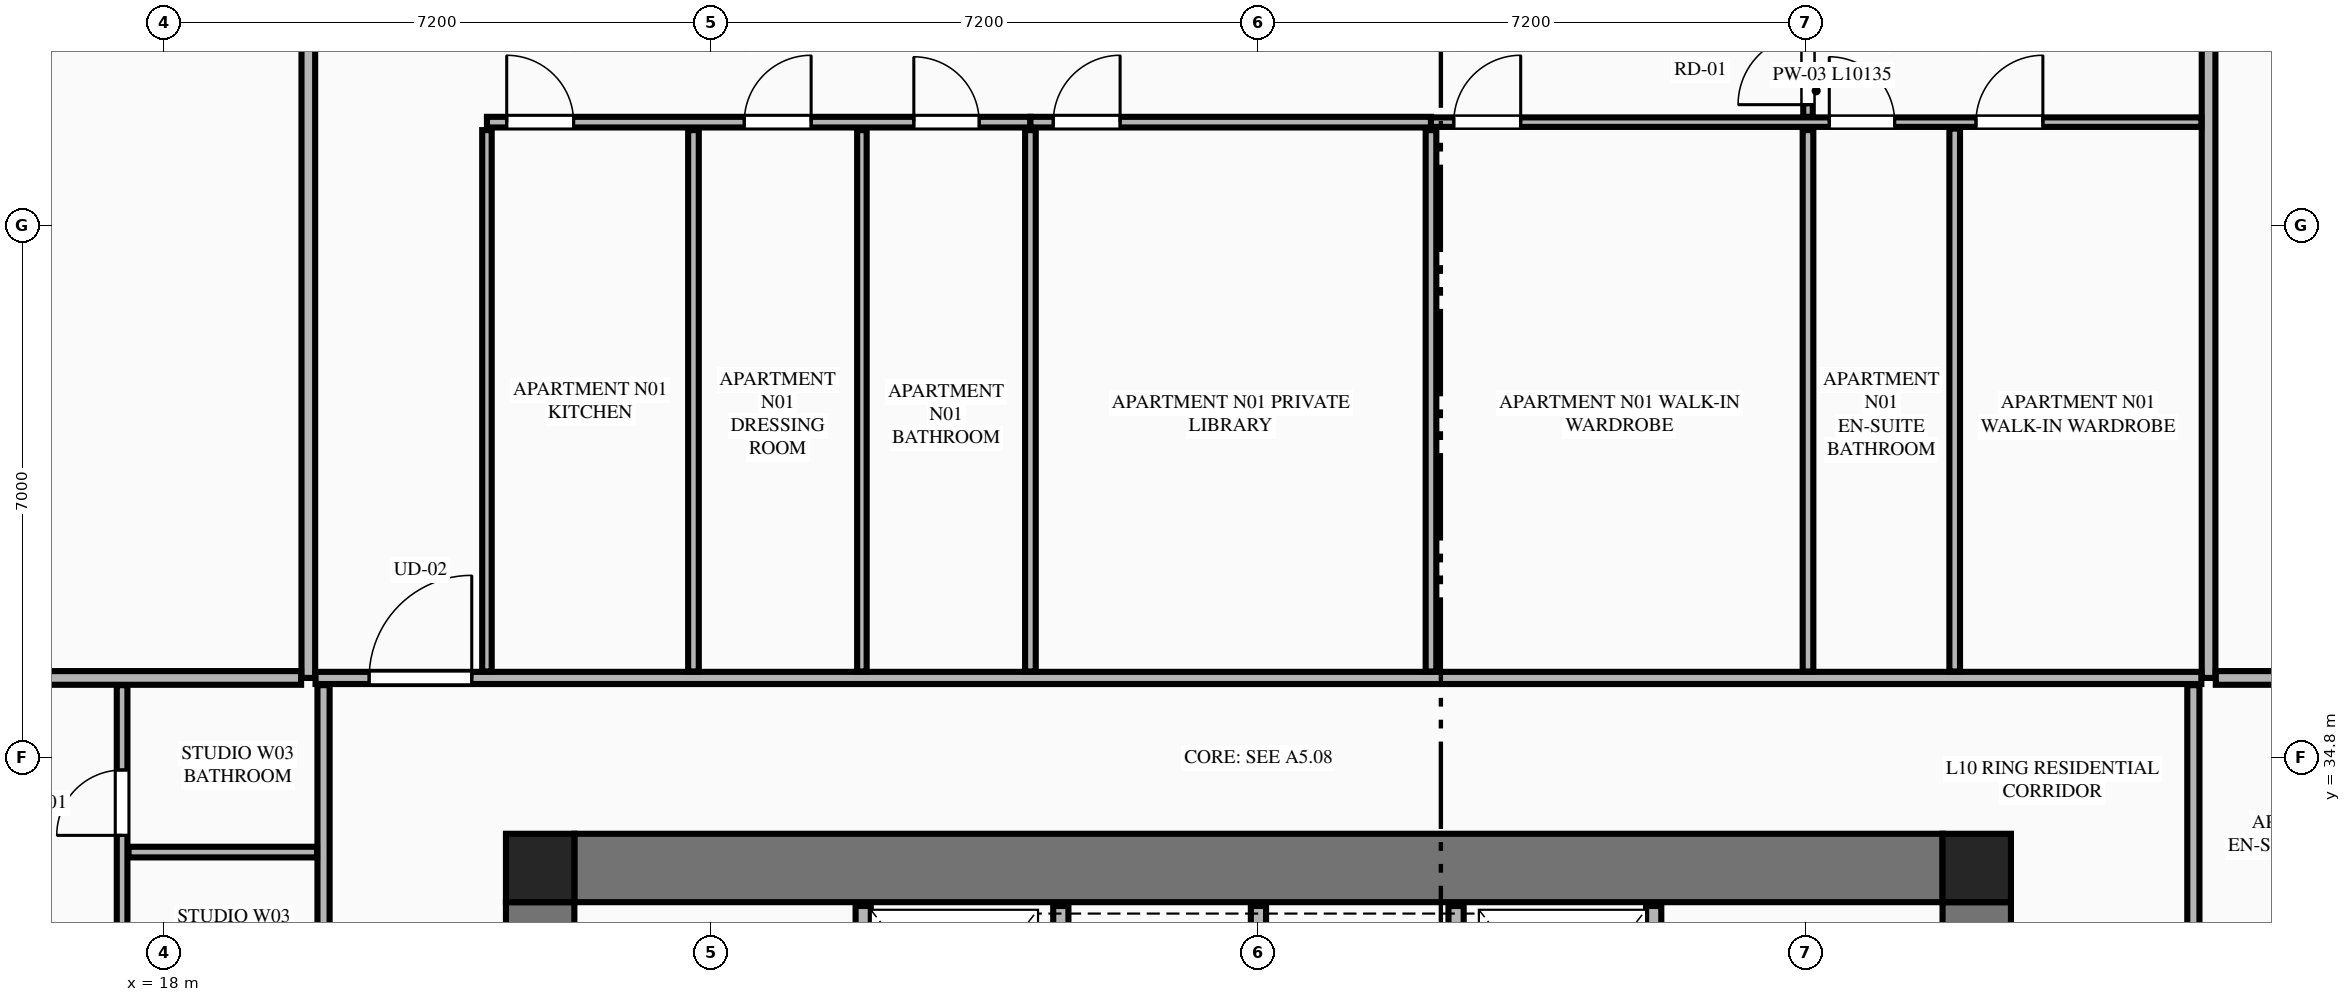
"""IFC4 building model, lengths in metres.
Left out: names, types, materials, properties, quantities, classifications, styles, units other than length and angle.
Written with IfcOpenShell. Run it as: python <this file> out.ifc"""

import sys

from ifc_helpers import new_model, si_unit, direction, frame, frame_2d, origin, origin_2d, place, context, subcontext, project, spatial, rectangle, extrude, element, fill, save


model = new_model("IFC4")
c1 = context("Model", 3, precision=1e-05, world=origin(), true_north=direction((0.0, 1.0)))
c2 = subcontext(c1, "Body", "Model", "MODEL_VIEW")
j1 = project(units=[si_unit("LENGTHUNIT", "METRE"), si_unit("PLANEANGLEUNIT", "RADIAN")], contexts=[c1])
p1 = place(None, origin())
s1 = spatial("IfcSite", under=j1, at=p1, CompositionType="ELEMENT")
p2 = place(p1, origin())
s2 = spatial("IfcBuilding", under=s1, at=p2, CompositionType="ELEMENT")
p3 = place(p2, frame((0.0, 0.0, 42.65)))
s3 = spatial("IfcBuildingStorey", under=s2, at=p3, CompositionType="ELEMENT", Elevation=42.65)
for number, where, z_axis, x_axis in (
    (1, (41.85, 33.35, 0.0), (0.0, 0.0, 1.0), (1.0, 0.0, 0.0)),
    (2, (22.95, 33.35, 0.0), (0.0, 0.0, 1.0), (1.0, 0.0, 0.0)),
):
    element("IfcColumn", number, at=place(p3, frame(where, z_axis=z_axis, x_axis=x_axis)), inside=s3, PredefinedType="COLUMN", context=c2, shape_type="SweptSolid", body=[
        extrude(rectangle(XDim=0.9, YDim=0.9, at=origin_2d()), origin(), (0.0, 0.0, 1.0), 3.55),
    ])
p4 = place(p3, frame((23.4, 33.35, 0.0), z_axis=(0.0, 0.0, 1.0), x_axis=(1.0, 0.0, 0.0)))
e3 = element("IfcWall", 3, at=p4, inside=s3, PredefinedType="SHEAR", context=c2, shape_type="SweptSolid", body=[
    extrude(rectangle(XDim=18.0, YDim=0.9, at=frame_2d((9.0, 0.0))), origin(), (0.0, 0.0, 1.0), 3.33),
])
p5 = place(p3, frame((22.95, 18.9, 0.0), z_axis=(0.0, 0.0, 1.0), x_axis=(0.0, 1.0, 0.0)))
e4 = element("IfcWall", 4, at=p5, inside=s3, PredefinedType="SHEAR", context=c2, shape_type="SweptSolid", body=[
    extrude(rectangle(XDim=14.0, YDim=0.9, at=frame_2d((7.0, 0.0))), origin(), (0.0, 0.0, 1.0), 3.33),
])
p6 = place(p5, frame((2.94, 0.0, 0.0)))
e5 = element("IfcOpeningElement", 5, at=p6, cuts=e4, PredefinedType="OPENING", context=c2, shape_type="SweptSolid", body=[
    extrude(rectangle(XDim=1.22, YDim=2.25, at=frame_2d((0.61, 1.125))), frame((0.0, 0.46, 0.0), z_axis=(0.0, -1.0, 0.0), x_axis=(1.0, 0.0, 0.0)), (0.0, 0.0, 1.0), 0.92),
])
p7 = place(p3, frame((41.85, 18.9, 0.0), z_axis=(0.0, 0.0, 1.0), x_axis=(0.0, 1.0, 0.0)))
e6 = element("IfcWall", 6, at=p7, inside=s3, PredefinedType="SHEAR", context=c2, shape_type="SweptSolid", body=[
    extrude(rectangle(XDim=14.0, YDim=0.9, at=frame_2d((7.0, 0.0))), origin(), (0.0, 0.0, 1.0), 3.33),
])
p8 = place(p7, frame((2.94, 0.0, 0.0)))
e7 = element("IfcOpeningElement", 7, at=p8, cuts=e6, PredefinedType="OPENING", context=c2, shape_type="SweptSolid", body=[
    extrude(rectangle(XDim=1.22, YDim=2.25, at=frame_2d((0.61, 1.125))), frame((0.0, 0.46, 0.0), z_axis=(0.0, -1.0, 0.0), x_axis=(1.0, 0.0, 0.0)), (0.0, 0.0, 1.0), 0.92),
])
for number, where, z_axis, x_axis in (
    (8, (27.2, 30.0, 0.0), (0.0, 0.0, 1.0), (0.0, 1.0, 0.0)),
    (9, (29.8, 30.0, 0.0), (0.0, 0.0, 1.0), (0.0, 1.0, 0.0)),
    (10, (32.4, 30.0, 0.0), (0.0, 0.0, 1.0), (0.0, 1.0, 0.0)),
    (11, (35.0, 30.0, 0.0), (0.0, 0.0, 1.0), (0.0, 1.0, 0.0)),
    (12, (37.6, 30.0, 0.0), (0.0, 0.0, 1.0), (0.0, 1.0, 0.0)),
):
    element("IfcWall", number, at=place(p3, frame(where, z_axis=z_axis, x_axis=x_axis)), inside=s3, PredefinedType="PLUMBINGWALL", context=c2, shape_type="SweptSolid", body=[
        extrude(rectangle(XDim=2.85, YDim=0.2, at=frame_2d((1.425, 0.0))), origin(), (0.0, 0.0, 1.0), 3.33),
    ])
for number, where, z_axis, x_axis in (
    (13, (19.9, 35.85, 0.0), (0.0, 0.0, 1.0), (0.0, 1.0, 0.0)),
    (14, (44.9, 35.85, 0.0), (0.0, 0.0, 1.0), (0.0, 1.0, 0.0)),
):
    element("IfcWall", number, at=place(p3, frame(where, z_axis=z_axis, x_axis=x_axis)), inside=s3, PredefinedType="PARTITIONING", context=c2, shape_type="SweptSolid", body=[
        extrude(rectangle(XDim=13.295, YDim=0.18, at=frame_2d((6.647, 0.0))), origin(), (0.0, 0.0, 1.0), 3.33),
    ])
p9 = place(p3, frame((19.995, 35.85, 0.0), z_axis=(0.0, 0.0, 1.0), x_axis=(1.0, 0.0, 0.0)))
e15 = element("IfcWall", 15, at=p9, inside=s3, PredefinedType="PARTITIONING", context=c2, shape_type="SweptSolid", body=[
    extrude(rectangle(XDim=24.81, YDim=0.16, at=frame_2d((12.405, 0.0))), origin(), (0.0, 0.0, 1.0), 3.33),
])
p10 = place(p9, frame((0.705, 0.0, 0.0)))
e16 = element("IfcOpeningElement", 16, at=p10, cuts=e15, PredefinedType="OPENING", context=c2, shape_type="SweptSolid", body=[
    extrude(rectangle(XDim=1.35, YDim=2.35, at=frame_2d((0.675, 1.175))), frame((0.0, 0.09, 0.0), z_axis=(0.0, -1.0, 0.0), x_axis=(1.0, 0.0, 0.0)), (0.0, 0.0, 1.0), 0.18),
])
p11 = place(p3, frame((22.25, 35.935, 0.0), z_axis=(0.0, 0.0, 1.0), x_axis=(0.0, 1.0, 0.0)))
e17 = element("IfcWall", 17, at=p11, inside=s3, PredefinedType="PARTITIONING", context=c2, shape_type="SweptSolid", body=[
    extrude(rectangle(XDim=7.122, YDim=0.125, at=frame_2d((3.561, 0.0))), origin(), (0.0, 0.0, 1.0), 2.7),
])
p12 = place(p3, frame((22.25, 43.162, 0.0), z_axis=(0.0, 0.0, 1.0), x_axis=(1.0, 0.0, 0.0)))
e18 = element("IfcWall", 18, at=p12, inside=s3, PredefinedType="PLUMBINGWALL", context=c2, shape_type="SweptSolid", body=[
    extrude(rectangle(XDim=7.15, YDim=0.14, at=frame_2d((3.575, 0.0))), origin(), (0.0, 0.0, 1.0), 3.33),
])
p13 = place(p12, frame((5.616, 0.0, 0.0)))
e19 = element("IfcOpeningElement", 19, at=p13, cuts=e18, PredefinedType="OPENING", context=c2, shape_type="SweptSolid", body=[
    extrude(rectangle(XDim=0.86, YDim=2.1, at=frame_2d((0.43, 1.05))), frame((0.0, 0.08, 0.0), z_axis=(0.0, -1.0, 0.0), x_axis=(1.0, 0.0, 0.0)), (0.0, 0.0, 1.0), 0.16),
])
p14 = place(p12, frame((0.26, 0.0, 0.0)))
e20 = element("IfcOpeningElement", 20, at=p14, cuts=e18, PredefinedType="OPENING", context=c2, shape_type="SweptSolid", body=[
    extrude(rectangle(XDim=0.88, YDim=2.15, at=frame_2d((0.44, 1.075))), frame((0.0, 0.08, 0.0), z_axis=(0.0, -1.0, 0.0), x_axis=(1.0, 0.0, 0.0)), (0.0, 0.0, 1.0), 0.16),
])
p15 = place(p12, frame((3.385, 0.0, 0.0)))
e21 = element("IfcOpeningElement", 21, at=p15, cuts=e18, PredefinedType="OPENING", context=c2, shape_type="SweptSolid", body=[
    extrude(rectangle(XDim=0.88, YDim=2.15, at=frame_2d((0.44, 1.075))), frame((0.0, 0.08, 0.0), z_axis=(0.0, -1.0, 0.0), x_axis=(1.0, 0.0, 0.0)), (0.0, 0.0, 1.0), 0.16),
])
p16 = place(p3, frame((29.4, 43.162, 0.0), z_axis=(0.0, 0.0, 1.0), x_axis=(1.0, 0.0, 0.0)))
e22 = element("IfcWall", 22, at=p16, inside=s3, PredefinedType="PLUMBINGWALL", context=c2, shape_type="SweptSolid", body=[
    extrude(rectangle(XDim=5.27, YDim=0.14, at=frame_2d((2.635, 0.0))), origin(), (0.0, 0.0, 1.0), 3.33),
])
p17 = place(p16, frame((0.3, 0.0, 0.0)))
e23 = element("IfcOpeningElement", 23, at=p17, cuts=e22, PredefinedType="OPENING", context=c2, shape_type="SweptSolid", body=[
    extrude(rectangle(XDim=0.88, YDim=2.15, at=frame_2d((0.44, 1.075))), frame((0.0, 0.08, 0.0), z_axis=(0.0, -1.0, 0.0), x_axis=(1.0, 0.0, 0.0)), (0.0, 0.0, 1.0), 0.16),
])
p18 = place(p3, frame((34.67, 43.162, 0.0), z_axis=(0.0, 0.0, 1.0), x_axis=(1.0, 0.0, 0.0)))
e24 = element("IfcWall", 24, at=p18, inside=s3, PredefinedType="PARTITIONING", context=c2, shape_type="SweptSolid", body=[
    extrude(rectangle(XDim=10.135, YDim=0.125, at=frame_2d((5.067, 0.0))), origin(), (0.0, 0.0, 1.0), 3.33),
])
p19 = place(p18, frame((5.24, 0.0, 0.0)))
e25 = element("IfcOpeningElement", 25, at=p19, cuts=e24, PredefinedType="OPENING", context=c2, shape_type="SweptSolid", body=[
    extrude(rectangle(XDim=0.86, YDim=2.1, at=frame_2d((0.43, 1.05))), frame((0.0, 0.073, 0.0), z_axis=(0.0, -1.0, 0.0), x_axis=(1.0, 0.0, 0.0)), (0.0, 0.0, 1.0), 0.145),
])
p20 = place(p18, frame((7.17, 0.0, 0.0)))
e26 = element("IfcOpeningElement", 26, at=p20, cuts=e24, PredefinedType="OPENING", context=c2, shape_type="SweptSolid", body=[
    extrude(rectangle(XDim=0.88, YDim=2.15, at=frame_2d((0.44, 1.075))), frame((0.0, 0.073, 0.0), z_axis=(0.0, -1.0, 0.0), x_axis=(1.0, 0.0, 0.0)), (0.0, 0.0, 1.0), 0.145),
])
p21 = place(p18, frame((0.3, 0.0, 0.0)))
e27 = element("IfcOpeningElement", 27, at=p21, cuts=e24, PredefinedType="OPENING", context=c2, shape_type="SweptSolid", body=[
    extrude(rectangle(XDim=0.88, YDim=2.15, at=frame_2d((0.44, 1.075))), frame((0.0, 0.073, 0.0), z_axis=(0.0, -1.0, 0.0), x_axis=(1.0, 0.0, 0.0)), (0.0, 0.0, 1.0), 0.145),
])
p22 = place(p3, frame((24.967, 35.935, 0.0), z_axis=(0.0, 0.0, 1.0), x_axis=(0.0, 1.0, 0.0)))
e28 = element("IfcWall", 28, at=p22, inside=s3, PredefinedType="PLUMBINGWALL", context=c2, shape_type="SweptSolid", body=[
    extrude(rectangle(XDim=7.122, YDim=0.14, at=frame_2d((3.561, 0.0))), origin(), (0.0, 0.0, 1.0), 3.33),
])
p23 = place(p3, frame((27.183, 35.935, 0.0), z_axis=(0.0, 0.0, 1.0), x_axis=(0.0, 1.0, 0.0)))
e29 = element("IfcWall", 29, at=p23, inside=s3, PredefinedType="PARTITIONING", context=c2, shape_type="SweptSolid", body=[
    extrude(rectangle(XDim=7.122, YDim=0.125, at=frame_2d((3.561, 0.0))), origin(), (0.0, 0.0, 1.0), 3.33),
])
p24 = place(p3, frame((39.63, 43.232, 0.0), z_axis=(0.0, 0.0, 1.0), x_axis=(0.0, 1.0, 0.0)))
e30 = element("IfcWall", 30, at=p24, inside=s3, PredefinedType="PARTITIONING", context=c2, shape_type="SweptSolid", body=[
    extrude(rectangle(XDim=1.33, YDim=0.125, at=frame_2d((0.665, 0.0))), origin(), (0.0, 0.0, 1.0), 3.33),
])
p25 = place(p24, frame((0.16, 0.0, 0.0)))
e31 = element("IfcOpeningElement", 31, at=p25, cuts=e30, PredefinedType="OPENING", context=c2, shape_type="SweptSolid", body=[
    extrude(rectangle(XDim=0.92, YDim=2.15, at=frame_2d((0.46, 1.075))), frame((0.0, 0.073, 0.0), z_axis=(0.0, -1.0, 0.0), x_axis=(1.0, 0.0, 0.0)), (0.0, 0.0, 1.0), 0.145),
])
for number, where, z_axis, x_axis in (
    (32, (29.4, 35.935, 0.0), (0.0, 0.0, 1.0), (0.0, 1.0, 0.0)),
    (33, (34.67, 35.935, 0.0), (0.0, 0.0, 1.0), (0.0, 1.0, 0.0)),
    (34, (39.63, 35.935, 0.0), (0.0, 0.0, 1.0), (0.0, 1.0, 0.0)),
):
    element("IfcWall", number, at=place(p3, frame(where, z_axis=z_axis, x_axis=x_axis)), inside=s3, PredefinedType="PLUMBINGWALL", context=c2, shape_type="SweptSolid", body=[
        extrude(rectangle(XDim=7.122, YDim=0.14, at=frame_2d((3.561, 0.0))), origin(), (0.0, 0.0, 1.0), 3.33),
    ])
p26 = place(p3, frame((41.56, 35.935, 0.0), z_axis=(0.0, 0.0, 1.0), x_axis=(0.0, 1.0, 0.0)))
e35 = element("IfcWall", 35, at=p26, inside=s3, PredefinedType="PLUMBINGWALL", context=c2, shape_type="SweptSolid", body=[
    extrude(rectangle(XDim=7.142, YDim=0.14, at=frame_2d((3.571, 0.0))), origin(), (0.0, 0.0, 1.0), 3.33),
])
for number, where, z_axis, x_axis in (
    (36, (10.665, 35.85, 0.0), (0.0, 0.0, 1.0), (1.0, 0.0, 0.0)),
    (37, (44.995, 35.85, 0.0), (0.0, 0.0, 1.0), (1.0, 0.0, 0.0)),
):
    element("IfcWall", number, at=place(p3, frame(where, z_axis=z_axis, x_axis=x_axis)), inside=s3, PredefinedType="PARTITIONING", context=c2, shape_type="SweptSolid", body=[
        extrude(rectangle(XDim=9.14, YDim=0.18, at=frame_2d((4.57, 0.0))), origin(), (0.0, 0.0, 1.0), 3.33),
    ])
p27 = place(p3, frame((20.1, 29.577, 0.0), z_axis=(0.0, 0.0, 1.0), x_axis=(0.0, 1.0, 0.0)))
e38 = element("IfcWall", 38, at=p27, inside=s3, PredefinedType="PARTITIONING", context=c2, shape_type="SweptSolid", body=[
    extrude(rectangle(XDim=6.178, YDim=0.16, at=frame_2d((3.089, 0.0))), origin(), (0.0, 0.0, 1.0), 2.7),
])
p28 = place(p27, frame((0.4, 0.0, 0.0)))
e39 = element("IfcOpeningElement", 39, at=p28, cuts=e38, PredefinedType="OPENING", context=c2, shape_type="SweptSolid", body=[
    extrude(rectangle(XDim=1.02, YDim=2.25, at=frame_2d((0.51, 1.125))), frame((0.0, 0.09, 0.0), z_axis=(0.0, -1.0, 0.0), x_axis=(1.0, 0.0, 0.0)), (0.0, 0.0, 1.0), 0.18),
])
p29 = place(p3, frame((17.45, 31.532, 0.0), z_axis=(0.0, 0.0, 1.0), x_axis=(0.0, 1.0, 0.0)))
e40 = element("IfcWall", 40, at=p29, inside=s3, PredefinedType="PLUMBINGWALL", context=c2, shape_type="SweptSolid", body=[
    extrude(rectangle(XDim=4.223, YDim=0.14, at=frame_2d((2.111, 0.0))), origin(), (0.0, 0.0, 1.0), 3.33),
])
p30 = place(p29, frame((2.247, 0.0, 0.0)))
e41 = element("IfcOpeningElement", 41, at=p30, cuts=e40, PredefinedType="OPENING", context=c2, shape_type="SweptSolid", body=[
    extrude(rectangle(XDim=0.86, YDim=2.1, at=frame_2d((0.43, 1.05))), frame((0.0, 0.08, 0.0), z_axis=(0.0, -1.0, 0.0), x_axis=(1.0, 0.0, 0.0)), (0.0, 0.0, 1.0), 0.16),
])
p31 = place(p29, frame((0.2, 0.0, 0.0)))
e42 = element("IfcOpeningElement", 42, at=p31, cuts=e40, PredefinedType="OPENING", context=c2, shape_type="SweptSolid", body=[
    extrude(rectangle(XDim=0.88, YDim=2.15, at=frame_2d((0.44, 1.075))), frame((0.0, 0.08, 0.0), z_axis=(0.0, -1.0, 0.0), x_axis=(1.0, 0.0, 0.0)), (0.0, 0.0, 1.0), 0.16),
])
p32 = place(p3, frame((17.535, 33.559, 0.0), z_axis=(0.0, 0.0, 1.0), x_axis=(1.0, 0.0, 0.0)))
e43 = element("IfcWall", 43, at=p32, inside=s3, PredefinedType="PLUMBINGWALL", context=c2, shape_type="SweptSolid", body=[
    extrude(rectangle(XDim=2.48, YDim=0.14, at=frame_2d((1.24, 0.0))), origin(), (0.0, 0.0, 1.0), 2.7),
])
p33 = place(p3, frame((44.7, 24.403, 0.0), z_axis=(0.0, 0.0, 1.0), x_axis=(0.0, 1.0, 0.0)))
e44 = element("IfcWall", 44, at=p33, inside=s3, PredefinedType="PARTITIONING", context=c2, shape_type="SweptSolid", body=[
    extrude(rectangle(XDim=11.352, YDim=0.16, at=frame_2d((5.676, 0.0))), origin(), (0.0, 0.0, 1.0), 2.7),
])
p34 = place(p33, frame((0.45, 0.0, 0.0)))
e45 = element("IfcOpeningElement", 45, at=p34, cuts=e44, PredefinedType="OPENING", context=c2, shape_type="SweptSolid", body=[
    extrude(rectangle(XDim=1.02, YDim=2.25, at=frame_2d((0.51, 1.125))), frame((0.0, 0.09, 0.0), z_axis=(0.0, -1.0, 0.0), x_axis=(1.0, 0.0, 0.0)), (0.0, 0.0, 1.0), 0.18),
])
p35 = place(p13, origin())
e46 = element("IfcDoor", 46, at=p35, inside=s3, OperationType="SINGLE_SWING_LEFT", PredefinedType="DOOR", context=c2, shape_type="SweptSolid", body=[
    extrude(rectangle(XDim=0.86, YDim=2.1, at=frame_2d((0.43, 1.05))), frame((0.0, 0.025, 0.0), z_axis=(0.0, -1.0, 0.0), x_axis=(1.0, 0.0, 0.0)), (0.0, 0.0, 1.0), 0.05),
])
fill(e19, e46)
p36 = place(p19, origin())
e47 = element("IfcDoor", 47, at=p36, inside=s3, OperationType="SINGLE_SWING_LEFT", PredefinedType="DOOR", context=c2, shape_type="SweptSolid", body=[
    extrude(rectangle(XDim=0.86, YDim=2.1, at=frame_2d((0.43, 1.05))), frame((0.0, 0.025, 0.0), z_axis=(0.0, -1.0, 0.0), x_axis=(1.0, 0.0, 0.0)), (0.0, 0.0, 1.0), 0.05),
])
fill(e25, e47)
p37 = place(p20, origin())
e48 = element("IfcDoor", 48, at=p37, inside=s3, OperationType="SINGLE_SWING_RIGHT", PredefinedType="DOOR", context=c2, shape_type="SweptSolid", body=[
    extrude(rectangle(XDim=0.88, YDim=2.15, at=frame_2d((0.44, 1.075))), frame((0.0, 0.025, 0.0), z_axis=(0.0, -1.0, 0.0), x_axis=(1.0, 0.0, 0.0)), (0.0, 0.0, 1.0), 0.05),
])
fill(e26, e48)
p38 = place(p10, origin())
e49 = element("IfcDoor", 49, at=p38, inside=s3, OperationType="SINGLE_SWING_RIGHT", PredefinedType="DOOR", context=c2, shape_type="SweptSolid", body=[
    extrude(rectangle(XDim=1.35, YDim=2.35, at=frame_2d((0.675, 1.175))), frame((0.0, 0.025, 0.0), z_axis=(0.0, -1.0, 0.0), x_axis=(1.0, 0.0, 0.0)), (0.0, 0.0, 1.0), 0.05),
])
fill(e16, e49)
p39 = place(p14, origin())
e50 = element("IfcDoor", 50, at=p39, inside=s3, OperationType="SINGLE_SWING_LEFT", PredefinedType="DOOR", context=c2, shape_type="SweptSolid", body=[
    extrude(rectangle(XDim=0.88, YDim=2.15, at=frame_2d((0.44, 1.075))), frame((0.0, 0.025, 0.0), z_axis=(0.0, -1.0, 0.0), x_axis=(1.0, 0.0, 0.0)), (0.0, 0.0, 1.0), 0.05),
])
fill(e20, e50)
p40 = place(p15, origin())
e51 = element("IfcDoor", 51, at=p40, inside=s3, OperationType="SINGLE_SWING_RIGHT", PredefinedType="DOOR", context=c2, shape_type="SweptSolid", body=[
    extrude(rectangle(XDim=0.88, YDim=2.15, at=frame_2d((0.44, 1.075))), frame((0.0, 0.025, 0.0), z_axis=(0.0, -1.0, 0.0), x_axis=(1.0, 0.0, 0.0)), (0.0, 0.0, 1.0), 0.05),
])
fill(e21, e51)
p41 = place(p17, origin())
e52 = element("IfcDoor", 52, at=p41, inside=s3, OperationType="SINGLE_SWING_RIGHT", PredefinedType="DOOR", context=c2, shape_type="SweptSolid", body=[
    extrude(rectangle(XDim=0.88, YDim=2.15, at=frame_2d((0.44, 1.075))), frame((0.0, 0.025, 0.0), z_axis=(0.0, -1.0, 0.0), x_axis=(1.0, 0.0, 0.0)), (0.0, 0.0, 1.0), 0.05),
])
fill(e23, e52)
p42 = place(p25, origin())
e53 = element("IfcDoor", 53, at=p42, inside=s3, OperationType="SINGLE_SWING_LEFT", PredefinedType="DOOR", context=c2, shape_type="SweptSolid", body=[
    extrude(rectangle(XDim=0.92, YDim=2.15, at=frame_2d((0.46, 1.075))), frame((0.0, 0.025, 0.0), z_axis=(0.0, -1.0, 0.0), x_axis=(1.0, 0.0, 0.0)), (0.0, 0.0, 1.0), 0.05),
])
fill(e31, e53)
p43 = place(p21, origin())
e54 = element("IfcDoor", 54, at=p43, inside=s3, OperationType="SINGLE_SWING_RIGHT", PredefinedType="DOOR", context=c2, shape_type="SweptSolid", body=[
    extrude(rectangle(XDim=0.88, YDim=2.15, at=frame_2d((0.44, 1.075))), frame((0.0, 0.025, 0.0), z_axis=(0.0, -1.0, 0.0), x_axis=(1.0, 0.0, 0.0)), (0.0, 0.0, 1.0), 0.05),
])
fill(e27, e54)
p44 = place(p30, origin())
e55 = element("IfcDoor", 55, at=p44, inside=s3, OperationType="SINGLE_SWING_LEFT", PredefinedType="DOOR", context=c2, shape_type="SweptSolid", body=[
    extrude(rectangle(XDim=0.86, YDim=2.1, at=frame_2d((0.43, 1.05))), frame((0.0, 0.025, 0.0), z_axis=(0.0, -1.0, 0.0), x_axis=(1.0, 0.0, 0.0)), (0.0, 0.0, 1.0), 0.05),
])
fill(e41, e55)
save(model, sys.argv[1])
